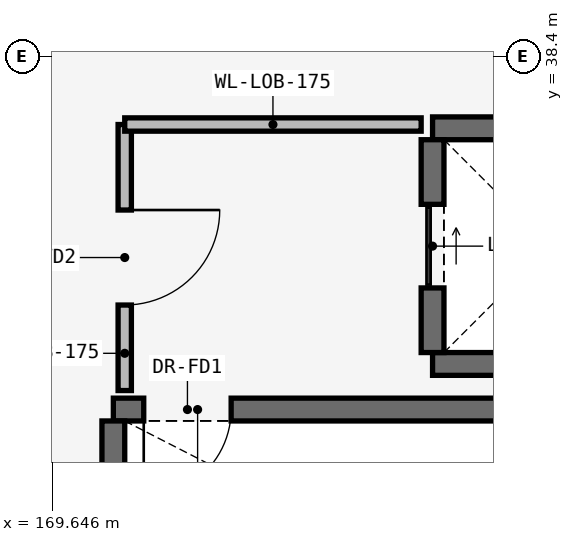
"""IFC4 building model, lengths in metres.
Left out: names, types, materials, properties, quantities, classifications, styles, units other than length and angle.
Written with IfcOpenShell. Run it as: python <this file> out.ifc"""

import sys

from ifc_helpers import new_model, si_unit, direction, frame, frame_2d, origin, place, context, subcontext, project, spatial, rectangle, extrude, element, fill, save


model = new_model("IFC4")
c1 = context("Model", 3, precision=1e-05, world=origin(), true_north=direction((0.0, 1.0)))
c2 = subcontext(c1, "Body", "Model", "MODEL_VIEW")
j1 = project(units=[si_unit("LENGTHUNIT", "METRE"), si_unit("PLANEANGLEUNIT", "RADIAN")], contexts=[c1])
p1 = place(None, origin())
s1 = spatial("IfcSite", under=j1, at=p1, CompositionType="ELEMENT")
p2 = place(p1, origin())
s2 = spatial("IfcBuilding", under=s1, at=p2, CompositionType="ELEMENT")
p3 = place(p2, frame((0.0, 0.0, 18.6)))
s3 = spatial("IfcBuildingStorey", under=s2, at=p3, CompositionType="ELEMENT", Elevation=18.6)
p4 = place(p3, frame((170.45, 33.75, 0.0), z_axis=(0.0, 0.0, 1.0), x_axis=(1.0, 0.0, 0.0)))
e1 = element("IfcWall", 1, at=p4, inside=s3, PredefinedType="SHEAR", context=c2, shape_type="SweptSolid", body=[
    extrude(rectangle(XDim=7.92, YDim=0.3, at=frame_2d((3.96, 0.0))), origin(), (0.0, 0.0, 1.0), 3.98),
])
p5 = place(p4, frame((0.4, 0.0, 0.0)))
e2 = element("IfcOpeningElement", 2, at=p5, cuts=e1, PredefinedType="OPENING", context=c2, shape_type="SweptSolid", body=[
    extrude(rectangle(XDim=1.15, YDim=2.15, at=frame_2d((0.575, 1.075))), frame((0.0, 0.165, 0.0), z_axis=(0.0, -1.0, 0.0), x_axis=(1.0, 0.0, 0.0)), (0.0, 0.0, 1.0), 0.33),
])
p6 = place(p3, frame((170.45, 29.7, 0.0), z_axis=(0.0, 0.0, 1.0), x_axis=(0.0, 1.0, 0.0)))
e3 = element("IfcWall", 3, at=p6, inside=s3, PredefinedType="SHEAR", context=c2, shape_type="SweptSolid", body=[
    extrude(rectangle(XDim=3.9, YDim=0.3, at=frame_2d((1.95, 0.0))), origin(), (0.0, 0.0, 1.0), 3.98),
])
for number, where, z_axis, x_axis in (
    (4, (174.65, 34.35, 0.0), (0.0, 0.0, 1.0), (1.0, 0.0, 0.0)),
    (5, (174.65, 37.45, 0.0), (0.0, 0.0, 1.0), (1.0, 0.0, 0.0)),
):
    element("IfcWall", number, at=place(p3, frame(where, z_axis=z_axis, x_axis=x_axis)), inside=s3, PredefinedType="SHEAR", context=c2, shape_type="SweptSolid", body=[
        extrude(rectangle(XDim=3.1, YDim=0.3, at=frame_2d((1.55, 0.0))), origin(), (0.0, 0.0, 1.0), 3.98),
    ])
p7 = place(p3, frame((174.65, 34.5, 0.0), z_axis=(0.0, 0.0, 1.0), x_axis=(0.0, 1.0, 0.0)))
e6 = element("IfcWall", 6, at=p7, inside=s3, PredefinedType="SHEAR", context=c2, shape_type="SweptSolid", body=[
    extrude(rectangle(XDim=2.8, YDim=0.3, at=frame_2d((1.4, 0.0))), origin(), (0.0, 0.0, 1.0), 3.98),
])
p8 = place(p7, frame((0.85, 0.0, 0.0)))
e7 = element("IfcOpeningElement", 7, at=p8, cuts=e6, PredefinedType="OPENING", context=c2, shape_type="SweptSolid", body=[
    extrude(rectangle(XDim=1.1, YDim=2.15, at=frame_2d((0.55, 1.075))), frame((0.0, 0.165, 0.0), z_axis=(0.0, -1.0, 0.0), x_axis=(1.0, 0.0, 0.0)), (0.0, 0.0, 1.0), 0.33),
])
p9 = place(p3, frame((170.6, 34.0, 0.0), z_axis=(0.0, 0.0, 1.0), x_axis=(0.0, 1.0, 0.0)))
e8 = element("IfcWall", 8, at=p9, inside=s3, PredefinedType="PARTITIONING", context=c2, shape_type="SweptSolid", body=[
    extrude(rectangle(XDim=3.5, YDim=0.175, at=frame_2d((1.75, 0.0))), origin(), (0.0, 0.0, 1.0), 3.98),
])
p10 = place(p9, frame((1.125, 0.0, 0.0)))
e9 = element("IfcOpeningElement", 9, at=p10, cuts=e8, PredefinedType="OPENING", context=c2, shape_type="SweptSolid", body=[
    extrude(rectangle(XDim=1.25, YDim=2.2, at=frame_2d((0.625, 1.1))), frame((0.0, 0.103, 0.0), z_axis=(0.0, -1.0, 0.0), x_axis=(1.0, 0.0, 0.0)), (0.0, 0.0, 1.0), 0.205),
])
p11 = place(p3, frame((170.6, 37.5, 0.0), z_axis=(0.0, 0.0, 1.0), x_axis=(1.0, 0.0, 0.0)))
e10 = element("IfcWall", 10, at=p11, inside=s3, PredefinedType="PARTITIONING", context=c2, shape_type="SweptSolid", body=[
    extrude(rectangle(XDim=3.9, YDim=0.175, at=frame_2d((1.95, 0.0))), origin(), (0.0, 0.0, 1.0), 3.98),
])
p12 = place(p5, frame((1.15, 0.0, 0.0), z_axis=(0.0, 0.0, 1.0), x_axis=(-1.0, 0.0, 0.0)))
e11 = element("IfcDoor", 11, at=p12, inside=s3, OperationType="SINGLE_SWING_LEFT", PredefinedType="DOOR", context=c2, shape_type="SweptSolid", body=[
    extrude(rectangle(XDim=1.15, YDim=2.15, at=frame_2d((0.575, 1.075))), frame((0.0, 0.025, 0.0), z_axis=(0.0, -1.0, 0.0), x_axis=(1.0, 0.0, 0.0)), (0.0, 0.0, 1.0), 0.05),
])
fill(e2, e11)
p13 = place(p8, origin())
e12 = element("IfcDoor", 12, at=p13, inside=s3, OperationType="SLIDING_TO_LEFT", PredefinedType="DOOR", context=c2, shape_type="SweptSolid", body=[
    extrude(rectangle(XDim=1.1, YDim=2.15, at=frame_2d((0.55, 1.075))), frame((0.0, 0.025, 0.0), z_axis=(0.0, -1.0, 0.0), x_axis=(1.0, 0.0, 0.0)), (0.0, 0.0, 1.0), 0.05),
])
fill(e7, e12)
p14 = place(p10, frame((1.25, 0.0, 0.0), z_axis=(0.0, 0.0, 1.0), x_axis=(-1.0, 0.0, 0.0)))
e13 = element("IfcDoor", 13, at=p14, inside=s3, OperationType="SINGLE_SWING_RIGHT", PredefinedType="DOOR", context=c2, shape_type="SweptSolid", body=[
    extrude(rectangle(XDim=1.25, YDim=2.2, at=frame_2d((0.625, 1.1))), frame((0.0, 0.025, 0.0), z_axis=(0.0, -1.0, 0.0), x_axis=(1.0, 0.0, 0.0)), (0.0, 0.0, 1.0), 0.05),
])
fill(e9, e13)
save(model, sys.argv[1])
